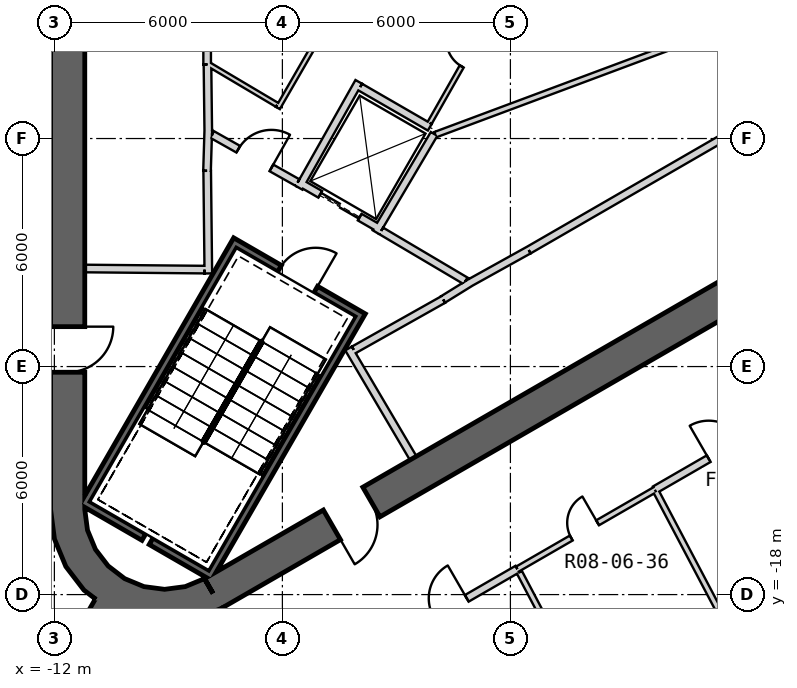
"""IFC4 building model, lengths in metres.
Left out: names, types, materials, properties, quantities, classifications, styles, units other than length and angle.
Written with IfcOpenShell. Run it as: python <this file> out.ifc"""

import sys

from ifc_helpers import new_model, si_unit, direction, frame, frame_2d, origin, place, context, subcontext, project, spatial, polyline, rectangle, outline, extrude, element, fill, save


model = new_model("IFC4")
c1 = context("Model", 3, precision=1e-05, world=origin(), true_north=direction((0.0, 1.0)))
c2 = subcontext(c1, "Body", "Model", "MODEL_VIEW")
j1 = project(units=[si_unit("LENGTHUNIT", "METRE"), si_unit("PLANEANGLEUNIT", "RADIAN")], contexts=[c1])
p1 = place(None, origin())
s1 = spatial("IfcSite", under=j1, at=p1, CompositionType="ELEMENT")
p2 = place(p1, origin())
s2 = spatial("IfcBuilding", under=s1, at=p2, CompositionType="ELEMENT")
p3 = place(p2, frame((0.0, 0.0, 39.5)))
s3 = spatial("IfcBuildingStorey", under=s2, at=p3, CompositionType="ELEMENT", Elevation=39.5)
p4 = place(p3, frame((-11.65, 15.762, 0.0), z_axis=(0.0, 0.0, 1.0), x_axis=(0.0, -1.0, 0.0)))
e1 = element("IfcWall", 1, at=p4, inside=s3, PredefinedType="SHEAR", context=c2, shape_type="SweptSolid", body=[
    extrude(rectangle(XDim=31.523, YDim=0.9, at=frame_2d((15.762, 0.0))), origin(), (0.0, 0.0, 1.0), 6.0),
])
p5 = place(p4, frame((3.612, 0.0, 0.0)))
e2 = element("IfcOpeningElement", 2, at=p5, cuts=e1, PredefinedType="OPENING", context=c2, shape_type="SweptSolid", body=[
    extrude(rectangle(XDim=1.2, YDim=2.4, at=frame_2d((0.6, 1.2))), frame((0.0, 0.46, 0.0), z_axis=(0.0, -1.0, 0.0), x_axis=(1.0, 0.0, 0.0)), (0.0, 0.0, 1.0), 0.92),
])
p6 = place(p4, frame((26.712, 0.0, 0.0)))
e3 = element("IfcOpeningElement", 3, at=p6, cuts=e1, PredefinedType="OPENING", context=c2, shape_type="SweptSolid", body=[
    extrude(rectangle(XDim=1.2, YDim=2.4, at=frame_2d((0.6, 1.2))), frame((0.0, 0.46, 0.0), z_axis=(0.0, -1.0, 0.0), x_axis=(1.0, 0.0, 0.0)), (0.0, 0.0, 1.0), 0.92),
])
p7 = place(p3, frame((-7.825, -17.97, 0.0), z_axis=(0.0, 0.0, 1.0), x_axis=(0.866028369851, 0.499994862586, 0.0)))
e4 = element("IfcWall", 4, at=p7, inside=s3, PredefinedType="SHEAR", context=c2, shape_type="SweptSolid", body=[
    extrude(rectangle(XDim=31.523, YDim=0.9, at=frame_2d((15.762, 0.0))), origin(), (0.0, 0.0, 1.0), 6.0),
])
p8 = place(p7, frame((26.712, 0.0, 0.0)))
e5 = element("IfcOpeningElement", 5, at=p8, cuts=e4, PredefinedType="OPENING", context=c2, shape_type="SweptSolid", body=[
    extrude(rectangle(XDim=1.2, YDim=2.4, at=frame_2d((0.6, 1.2))), frame((0.0, 0.46, 0.0), z_axis=(0.0, -1.0, 0.0), x_axis=(1.0, 0.0, 0.0)), (0.0, 0.0, 1.0), 0.92),
])
p9 = place(p7, frame((3.612, 0.0, 0.0)))
e6 = element("IfcOpeningElement", 6, at=p9, cuts=e4, PredefinedType="OPENING", context=c2, shape_type="SweptSolid", body=[
    extrude(rectangle(XDim=1.2, YDim=2.4, at=frame_2d((0.6, 1.2))), frame((0.0, 0.46, 0.0), z_axis=(0.0, -1.0, 0.0), x_axis=(1.0, 0.0, 0.0)), (0.0, 0.0, 1.0), 0.92),
])
p10 = place(p3, origin())
e7 = element("IfcWall", 7, at=p10, inside=s3, PredefinedType="SHEAR", context=c2, shape_type="SweptSolid", body=[
    extrude(outline(polyline([(-12.1, -15.762), (-11.998, -16.538), (-11.698, -17.262), (-11.221, -17.883), (-10.6, -18.36), (-9.876, -18.659), (-9.1, -18.762), (-8.323, -18.659), (-7.6, -18.36), (-8.05, -17.58), (-8.556, -17.79), (-9.1, -17.862), (-9.644, -17.79), (-10.15, -17.58), (-10.585, -17.247), (-10.919, -16.812), (-11.128, -16.305), (-11.2, -15.762), (-12.1, -15.762)])), origin(), (0.0, 0.0, 1.0), 6.0),
])
p11 = place(p3, frame((-10.575, -18.316, 0.0), z_axis=(0.0, 0.0, 1.0), x_axis=(-0.499996575515, -0.866027380903, 0.0)))
e8 = element("IfcWall", 8, at=p11, inside=s3, PredefinedType="SHEAR", context=c2, shape_type="SweptSolid", body=[
    extrude(rectangle(XDim=13.954, YDim=0.8, at=frame_2d((6.977, 0.0))), origin(), (0.0, 0.0, 1.0), 6.0),
])
p12 = place(p11, frame((1.0, 0.0, 0.0)))
e9 = element("IfcOpeningElement", 9, at=p12, cuts=e8, PredefinedType="OPENING", context=c2, shape_type="SweptSolid", body=[
    extrude(rectangle(XDim=1.4, YDim=2.4, at=frame_2d((0.7, 1.2))), frame((0.0, 0.41, 0.0), z_axis=(0.0, -1.0, 0.0), x_axis=(1.0, 0.0, 0.0)), (0.0, 0.0, 1.0), 0.82),
])
p13 = place(p3, frame((-4.859, -32.954, 0.0), z_axis=(0.0, 0.0, 1.0), x_axis=(0.865991780246, 0.500058233156, 0.0)))
e10 = element("IfcWall", 10, at=p13, inside=s3, PredefinedType="SOLIDWALL", context=c2, shape_type="SweptSolid", body=[
    extrude(rectangle(XDim=41.371, YDim=0.24, at=frame_2d((20.685, 0.0))), origin(), (0.0, 0.0, 1.0), 5.7),
])
p14 = place(p3, frame((-7.98, 4.05, 0.0), z_axis=(0.0, 0.0, 1.0), x_axis=(0.0, -1.0, 0.0)))
e11 = element("IfcWall", 11, at=p14, inside=s3, PredefinedType="PLUMBINGWALL", context=c2, shape_type="SweptSolid", body=[
    extrude(rectangle(XDim=8.1, YDim=0.2, at=frame_2d((4.05, 0.0))), origin(), (0.0, 0.0, 1.0), 5.7),
])
p15 = place(p3, frame((-7.95, -5.772, 0.0), z_axis=(0.0, 0.0, 1.0), x_axis=(-0.030803413295, -0.999525462272, 0.0)))
e12 = element("IfcWall", 12, at=p15, inside=s3, PredefinedType="PLUMBINGWALL", context=c2, shape_type="SweptSolid", body=[
    extrude(rectangle(XDim=1.078, YDim=0.2, at=frame_2d((0.539, 0.0))), origin(), (0.0, 0.0, 1.0), 5.7),
])
p16 = place(p3, frame((-7.971, -4.05, 0.0), z_axis=(0.0, 0.0, 1.0), x_axis=(0.012042535896, -0.999927486035, 0.0)))
e13 = element("IfcWall", 13, at=p16, inside=s3, PredefinedType="PLUMBINGWALL", context=c2, shape_type="SweptSolid", body=[
    extrude(rectangle(XDim=1.845, YDim=0.2, at=frame_2d((0.922, 0.0))), origin(), (0.0, 0.0, 1.0), 5.7),
])
p17 = place(p3, frame((-7.979, -6.85, 0.0), z_axis=(0.0, 0.0, 1.0), x_axis=(0.011121475088, -0.999938154483, 0.0)))
e14 = element("IfcWall", 14, at=p17, inside=s3, PredefinedType="PLUMBINGWALL", context=c2, shape_type="SweptSolid", body=[
    extrude(rectangle(XDim=2.7, YDim=0.2, at=frame_2d((1.35, 0.0))), origin(), (0.0, 0.0, 1.0), 5.7),
])
p18 = place(p3, frame((-8.05, -9.449, 0.0), z_axis=(0.0, 0.0, 1.0), x_axis=(-0.999957467379, 0.009222983926, 0.0)))
e15 = element("IfcWall", 15, at=p18, inside=s3, PredefinedType="PLUMBINGWALL", context=c2, shape_type="SweptSolid", body=[
    extrude(rectangle(XDim=3.15, YDim=0.2, at=frame_2d((1.575, 0.0))), origin(), (0.0, 0.0, 1.0), 5.7),
])
p19 = place(p3, frame((0.483, -8.936, 0.0), z_axis=(0.0, 0.0, 1.0), x_axis=(0.866030989016, 0.499990325971, 0.0)))
e16 = element("IfcWall", 16, at=p19, inside=s3, PredefinedType="PLUMBINGWALL", context=c2, shape_type="SweptSolid", body=[
    extrude(rectangle(XDim=8.1, YDim=0.2, at=frame_2d((4.05, 0.0))), origin(), (0.0, 0.0, 1.0), 5.7),
])
p20 = place(p3, frame((-2.558, -14.409, 0.0), z_axis=(0.0, 0.0, 1.0), x_axis=(-0.507997497166, 0.861358544901, 0.0)))
e17 = element("IfcWall", 17, at=p20, inside=s3, PredefinedType="PLUMBINGWALL", context=c2, shape_type="SweptSolid", body=[
    extrude(rectangle(XDim=3.35, YDim=0.2, at=frame_2d((1.675, 0.0))), origin(), (0.0, 0.0, 1.0), 5.7),
])
p21 = place(p3, frame((-1.769, -10.237, 0.0), z_axis=(0.0, 0.0, 1.0), x_axis=(-0.871534483978, -0.490334215854, 0.0)))
e18 = element("IfcWall", 18, at=p21, inside=s3, PredefinedType="PLUMBINGWALL", context=c2, shape_type="SweptSolid", body=[
    extrude(rectangle(XDim=2.7, YDim=0.2, at=frame_2d((1.35, 0.0))), origin(), (0.0, 0.0, 1.0), 5.7),
])
p22 = place(p3, frame((-1.024, -9.771, 0.0), z_axis=(0.0, 0.0, 1.0), x_axis=(-0.850348075135, -0.526220629693, 0.0)))
e19 = element("IfcWall", 19, at=p22, inside=s3, PredefinedType="PLUMBINGWALL", context=c2, shape_type="SweptSolid", body=[
    extrude(rectangle(XDim=0.878, YDim=0.2, at=frame_2d((0.439, 0.0))), origin(), (0.0, 0.0, 1.0), 5.7),
])
p23 = place(p3, frame((-1.13, -9.831, 0.0), z_axis=(0.0, 0.0, 1.0), x_axis=(0.874269620932, 0.485440655401, 0.0)))
e20 = element("IfcWall", 20, at=p23, inside=s3, PredefinedType="PLUMBINGWALL", context=c2, shape_type="SweptSolid", body=[
    extrude(rectangle(XDim=1.845, YDim=0.2, at=frame_2d((0.922, 0.0))), origin(), (0.0, 0.0, 1.0), 5.7),
])
p24 = place(p3, frame((-3.905, -10.563, -0.35), z_axis=(0.0, 0.0, 1.0), x_axis=(-0.500012932018, -0.866017937352, 0.0)))
e21 = element("IfcWall", 21, at=p24, inside=s3, PredefinedType="SHEAR", context=c2, shape_type="SweptSolid", body=[
    extrude(rectangle(XDim=8.1, YDim=0.2, at=frame_2d((4.05, 0.0))), origin(), (0.0, 0.0, 1.0), 6.05),
])
p25 = place(p3, frame((-11.282, -15.541, -0.35), z_axis=(0.0, 0.0, 1.0), x_axis=(0.866000578957, -0.500042995397, 0.0)))
e22 = element("IfcWall", 22, at=p25, inside=s3, PredefinedType="SHEAR", context=c2, shape_type="SweptSolid", body=[
    extrude(rectangle(XDim=1.89, YDim=0.2, at=frame_2d((0.945, 0.0))), origin(), (0.0, 0.0, 1.0), 6.05),
])
p26 = place(p3, frame((-9.455, -16.596, -0.35), z_axis=(0.0, 0.0, 1.0), x_axis=(0.866038843867, -0.499976720371, 0.0)))
e23 = element("IfcWall", 23, at=p26, inside=s3, PredefinedType="SHEAR", context=c2, shape_type="SweptSolid", body=[
    extrude(rectangle(XDim=1.69, YDim=0.2, at=frame_2d((0.845, 0.0))), origin(), (0.0, 0.0, 1.0), 6.05),
])
p27 = place(p3, frame((-7.196, -8.663, -0.35), z_axis=(0.0, 0.0, 1.0), x_axis=(-0.499997992926, -0.866026562566, 0.0)))
e24 = element("IfcWall", 24, at=p27, inside=s3, PredefinedType="SHEAR", context=c2, shape_type="SweptSolid", body=[
    extrude(rectangle(XDim=7.9, YDim=0.2, at=frame_2d((3.95, 0.0))), origin(), (0.0, 0.0, 1.0), 6.05),
])
p28 = place(p3, frame((-4.041, -10.599, -0.35), z_axis=(0.0, 0.0, 1.0), x_axis=(-0.866047807691, 0.499961193289, 0.0)))
e25 = element("IfcWall", 25, at=p28, inside=s3, PredefinedType="SHEAR", context=c2, shape_type="SweptSolid", body=[
    extrude(rectangle(XDim=3.6, YDim=0.2, at=frame_2d((1.8, 0.0))), origin(), (0.0, 0.0, 1.0), 6.05),
])
p29 = place(p28, frame((1.25, 0.0, 0.35)))
e26 = element("IfcOpeningElement", 26, at=p29, cuts=e25, PredefinedType="OPENING", context=c2, shape_type="SweptSolid", body=[
    extrude(rectangle(XDim=1.1, YDim=2.1, at=frame_2d((0.55, 1.05))), frame((0.0, 0.11, 0.0), z_axis=(0.0, -1.0, 0.0), x_axis=(1.0, 0.0, 0.0)), (0.0, 0.0, 1.0), 0.22),
])
p30 = place(p3, frame((-3.446, -8.368, 0.0), z_axis=(0.0, 0.0, 1.0), x_axis=(-0.866024647952, 0.500001309137, 0.0)))
e27 = element("IfcWall", 27, at=p30, inside=s3, PredefinedType="PLUMBINGWALL", context=c2, shape_type="SweptSolid", body=[
    extrude(rectangle(XDim=2.4, YDim=0.2, at=frame_2d((1.2, 0.0))), origin(), (0.0, 0.0, 1.0), 5.7),
])
p31 = place(p30, frame((0.6, 0.0, 0.0)))
e28 = element("IfcOpeningElement", 28, at=p31, cuts=e27, PredefinedType="OPENING", context=c2, shape_type="SweptSolid", body=[
    extrude(rectangle(XDim=1.2, YDim=2.4, at=frame_2d((0.6, 1.2))), frame((0.0, 0.11, 0.0), z_axis=(0.0, -1.0, 0.0), x_axis=(1.0, 0.0, 0.0)), (0.0, 0.0, 1.0), 0.22),
])
p32 = place(p3, frame((-2.008, -5.878, 0.0), z_axis=(0.0, 0.0, 1.0), x_axis=(-0.508893526607, -0.860829471253, 0.0)))
e29 = element("IfcWall", 29, at=p32, inside=s3, PredefinedType="PLUMBINGWALL", context=c2, shape_type="SweptSolid", body=[
    extrude(rectangle(XDim=3.005, YDim=0.2, at=frame_2d((1.502, 0.0))), origin(), (0.0, 0.0, 1.0), 5.7),
])
p33 = place(p3, frame((-3.99, -4.509, 0.0), z_axis=(0.0, 0.0, 1.0), x_axis=(-0.491358283181, -0.870957540612, 0.0)))
e30 = element("IfcWall", 30, at=p33, inside=s3, PredefinedType="PLUMBINGWALL", context=c2, shape_type="SweptSolid", body=[
    extrude(rectangle(XDim=3.2, YDim=0.2, at=frame_2d((1.6, 0.0))), origin(), (0.0, 0.0, 1.0), 5.7),
])
p34 = place(p3, frame((-3.953, -4.646, 0.0), z_axis=(0.0, 0.0, 1.0), x_axis=(0.866060616833, -0.499939004251, 0.0)))
e31 = element("IfcWall", 31, at=p34, inside=s3, PredefinedType="PLUMBINGWALL", context=c2, shape_type="SweptSolid", body=[
    extrude(rectangle(XDim=2.115, YDim=0.2, at=frame_2d((1.057, 0.0))), origin(), (0.0, 0.0, 1.0), 5.7),
])
p35 = place(p3, frame((-3.401, -8.43, 0.0), z_axis=(0.0, 0.0, 1.0), x_axis=(0.860615607571, -0.509255118781, 0.0)))
e32 = element("IfcWall", 32, at=p35, inside=s3, PredefinedType="PARTITIONING", context=c2, shape_type="SweptSolid", body=[
    extrude(rectangle(XDim=2.581, YDim=0.2, at=frame_2d((1.29, 0.0))), origin(), (0.0, 0.0, 1.0), 5.7),
])
p36 = place(p3, frame((-7.849, -5.894, 0.0), z_axis=(0.0, 0.0, 1.0), x_axis=(0.871363259478, -0.490638431059, 0.0)))
e33 = element("IfcWall", 33, at=p36, inside=s3, PredefinedType="PARTITIONING", context=c2, shape_type="SweptSolid", body=[
    extrude(rectangle(XDim=2.581, YDim=0.2, at=frame_2d((1.291, 0.0))), origin(), (0.0, 0.0, 1.0), 5.7),
])
p37 = place(p36, frame((0.791, 0.0, 0.0)))
e34 = element("IfcOpeningElement", 34, at=p37, cuts=e33, PredefinedType="OPENING", context=c2, shape_type="SweptSolid", body=[
    extrude(rectangle(XDim=1.0, YDim=2.1, at=frame_2d((0.5, 1.05))), frame((0.0, 0.11, 0.0), z_axis=(0.0, -1.0, 0.0), x_axis=(1.0, 0.0, 0.0)), (0.0, 0.0, 1.0), 0.22),
])
p38 = place(p3, frame((6.729, -2.65, 0.0), z_axis=(0.0, 0.0, 1.0), x_axis=(-0.936914282609, -0.349559189613, 0.0)))
e35 = element("IfcWall", 35, at=p38, inside=s3, PredefinedType="PLUMBINGWALL", context=c2, shape_type="SweptSolid", body=[
    extrude(rectangle(XDim=9.291, YDim=0.15, at=frame_2d((4.645, 0.0))), origin(), (0.0, 0.0, 1.0), 5.7),
])
p39 = place(p3, frame((0.007, -1.836, 0.0), z_axis=(0.0, 0.0, 1.0), x_axis=(-0.494077470797, -0.869417881603, 0.0)))
e36 = element("IfcWall", 36, at=p39, inside=s3, PredefinedType="PARTITIONING", context=c2, shape_type="SweptSolid", body=[
    extrude(rectangle(XDim=4.314, YDim=0.12, at=frame_2d((2.157, 0.0))), origin(), (0.0, 0.0, 1.0), 5.7),
])
p40 = place(p39, frame((1.808, 0.0, 0.0)))
e37 = element("IfcOpeningElement", 37, at=p40, cuts=e36, PredefinedType="OPENING", context=c2, shape_type="SweptSolid", body=[
    extrude(rectangle(XDim=0.8, YDim=2.1, at=frame_2d((0.4, 1.05))), frame((0.0, 0.07, 0.0), z_axis=(0.0, -1.0, 0.0), x_axis=(1.0, 0.0, 0.0)), (0.0, 0.0, 1.0), 0.14),
])
p41 = place(p3, frame((-6.118, -5.197, 0.0), z_axis=(0.0, 0.0, 1.0), x_axis=(0.499990139034, 0.866031096941, 0.0)))
e38 = element("IfcWall", 38, at=p41, inside=s3, PredefinedType="PARTITIONING", context=c2, shape_type="SweptSolid", body=[
    extrude(rectangle(XDim=3.0, YDim=0.12, at=frame_2d((1.5, 0.0))), origin(), (0.0, 0.0, 1.0), 5.7),
])
p42 = place(p3, frame((-7.95, -4.041, 0.0), z_axis=(0.0, 0.0, 1.0), x_axis=(0.860112457103, -0.510104461004, 0.0)))
e39 = element("IfcWall", 39, at=p42, inside=s3, PredefinedType="PARTITIONING", context=c2, shape_type="SweptSolid", body=[
    extrude(rectangle(XDim=2.104, YDim=0.12, at=frame_2d((1.052, 0.0))), origin(), (0.0, 0.0, 1.0), 5.7),
])
p43 = place(p3, frame((-6.713, -21.312, 0.0), z_axis=(0.0, 0.0, 1.0), x_axis=(0.866023773276, 0.500002824113, 0.0)))
e40 = element("IfcWall", 40, at=p43, inside=s3, PredefinedType="PARTITIONING", context=c2, shape_type="SweptSolid", body=[
    extrude(rectangle(XDim=7.965, YDim=0.2, at=frame_2d((3.982, 0.0))), origin(), (0.0, 0.0, 1.0), 4.88),
])
p44 = place(p43, frame((1.5, 0.0, 0.0)))
e41 = element("IfcOpeningElement", 41, at=p44, cuts=e40, PredefinedType="OPENING", context=c2, shape_type="SweptSolid", body=[
    extrude(rectangle(XDim=1.0, YDim=2.1, at=frame_2d((0.5, 1.05))), frame((0.0, 0.11, 0.0), z_axis=(0.0, -1.0, 0.0), x_axis=(1.0, 0.0, 0.0)), (0.0, 0.0, 1.0), 0.22),
])
p45 = place(p43, frame((5.426, 0.0, 0.0)))
e42 = element("IfcOpeningElement", 42, at=p45, cuts=e40, PredefinedType="OPENING", context=c2, shape_type="SweptSolid", body=[
    extrude(rectangle(XDim=1.0, YDim=2.1, at=frame_2d((0.5, 1.05))), frame((0.0, 0.11, 0.0), z_axis=(0.0, -1.0, 0.0), x_axis=(1.0, 0.0, 0.0)), (0.0, 0.0, 1.0), 0.22),
])
p46 = place(p3, frame((3.8, -15.242, 0.0), z_axis=(0.0, 0.0, 1.0), x_axis=(0.866025905383, 0.499999131204, 0.0)))
e43 = element("IfcWall", 43, at=p46, inside=s3, PredefinedType="PARTITIONING", context=c2, shape_type="SweptSolid", body=[
    extrude(rectangle(XDim=20.7, YDim=0.2, at=frame_2d((10.35, 0.0))), origin(), (0.0, 0.0, 1.0), 4.88),
])
p47 = place(p46, frame((1.636, 0.0, 0.0)))
e44 = element("IfcOpeningElement", 44, at=p47, cuts=e43, PredefinedType="OPENING", context=c2, shape_type="SweptSolid", body=[
    extrude(rectangle(XDim=1.0, YDim=2.1, at=frame_2d((0.5, 1.05))), frame((0.0, 0.11, 0.0), z_axis=(0.0, -1.0, 0.0), x_axis=(1.0, 0.0, 0.0)), (0.0, 0.0, 1.0), 0.22),
])
p48 = place(p46, frame((5.812, 0.0, 0.0)))
e45 = element("IfcOpeningElement", 45, at=p48, cuts=e43, PredefinedType="OPENING", context=c2, shape_type="SweptSolid", body=[
    extrude(rectangle(XDim=1.0, YDim=2.1, at=frame_2d((0.5, 1.05))), frame((0.0, 0.11, 0.0), z_axis=(0.0, -1.0, 0.0), x_axis=(1.0, 0.0, 0.0)), (0.0, 0.0, 1.0), 0.22),
])
p49 = place(p46, frame((9.987, 0.0, 0.0)))
e46 = element("IfcOpeningElement", 46, at=p49, cuts=e43, PredefinedType="OPENING", context=c2, shape_type="SweptSolid", body=[
    extrude(rectangle(XDim=1.0, YDim=2.1, at=frame_2d((0.5, 1.05))), frame((0.0, 0.11, 0.0), z_axis=(0.0, -1.0, 0.0), x_axis=(1.0, 0.0, 0.0)), (0.0, 0.0, 1.0), 0.22),
])
p50 = place(p46, frame((14.162, 0.0, 0.0)))
e47 = element("IfcOpeningElement", 47, at=p50, cuts=e43, PredefinedType="OPENING", context=c2, shape_type="SweptSolid", body=[
    extrude(rectangle(XDim=1.0, YDim=2.1, at=frame_2d((0.5, 1.05))), frame((0.0, 0.11, 0.0), z_axis=(0.0, -1.0, 0.0), x_axis=(1.0, 0.0, 0.0)), (0.0, 0.0, 1.0), 0.22),
])
p51 = place(p46, frame((18.138, 0.0, 0.0)))
e48 = element("IfcOpeningElement", 48, at=p51, cuts=e43, PredefinedType="OPENING", context=c2, shape_type="SweptSolid", body=[
    extrude(rectangle(XDim=1.0, YDim=2.1, at=frame_2d((0.5, 1.05))), frame((0.0, 0.11, 0.0), z_axis=(0.0, -1.0, 0.0), x_axis=(1.0, 0.0, 0.0)), (0.0, 0.0, 1.0), 0.22),
])
p52 = place(p3, frame((0.184, -17.33, 0.0), z_axis=(0.0, 0.0, 1.0), x_axis=(0.866028817718, 0.499994086848, 0.0)))
e49 = element("IfcWall", 49, at=p52, inside=s3, PredefinedType="PLUMBINGWALL", context=c2, shape_type="SweptSolid", body=[
    extrude(rectangle(XDim=4.175, YDim=0.15, at=frame_2d((2.088, 0.0))), origin(), (0.0, 0.0, 1.0), 4.98),
])
p53 = place(p52, frame((1.636, 0.0, 0.0)))
e50 = element("IfcOpeningElement", 50, at=p53, cuts=e49, PredefinedType="OPENING", context=c2, shape_type="SweptSolid", body=[
    extrude(rectangle(XDim=0.8, YDim=2.1, at=frame_2d((0.4, 1.05))), frame((0.0, 0.085, 0.0), z_axis=(0.0, -1.0, 0.0), x_axis=(1.0, 0.0, 0.0)), (0.0, 0.0, 1.0), 0.17),
])
p54 = place(p3, frame((0.238, -17.414, 0.0), z_axis=(0.0, 0.0, 1.0), x_axis=(0.466378215556, -0.884585417048, 0.0)))
e51 = element("IfcWall", 51, at=p54, inside=s3, PredefinedType="PLUMBINGWALL", context=c2, shape_type="SweptSolid", body=[
    extrude(rectangle(XDim=6.959, YDim=0.15, at=frame_2d((3.479, 0.0))), origin(), (0.0, 0.0, 1.0), 5.7),
])
p55 = place(p3, frame((7.099, -21.482, 0.0), z_axis=(0.0, 0.0, 1.0), x_axis=(-0.466393246704, 0.884577492043, 0.0)))
e52 = element("IfcWall", 52, at=p55, inside=s3, PredefinedType="PLUMBINGWALL", context=c2, shape_type="SweptSolid", body=[
    extrude(rectangle(XDim=6.984, YDim=0.15, at=frame_2d((3.492, 0.0))), origin(), (0.0, 0.0, 1.0), 5.7),
])
p56 = place(p29, origin())
e53 = element("IfcDoor", 53, at=p56, inside=s3, OperationType="SINGLE_SWING_LEFT", PredefinedType="USERDEFINED", context=c2, shape_type="SweptSolid", body=[
    extrude(rectangle(XDim=1.1, YDim=2.1, at=frame_2d((0.55, 1.05))), frame((0.0, 0.025, 0.0), z_axis=(0.0, -1.0, 0.0), x_axis=(1.0, 0.0, 0.0)), (0.0, 0.0, 1.0), 0.05),
])
fill(e26, e53)
p57 = place(p37, origin())
e54 = element("IfcDoor", 54, at=p57, inside=s3, OperationType="SINGLE_SWING_RIGHT", PredefinedType="USERDEFINED", context=c2, shape_type="SweptSolid", body=[
    extrude(rectangle(XDim=1.0, YDim=2.1, at=frame_2d((0.5, 1.05))), frame((0.0, 0.025, 0.0), z_axis=(0.0, -1.0, 0.0), x_axis=(1.0, 0.0, 0.0)), (0.0, 0.0, 1.0), 0.05),
])
fill(e34, e54)
p58 = place(p31, origin())
e55 = element("IfcDoor", 55, at=p58, inside=s3, OperationType="SLIDING_TO_LEFT", PredefinedType="USERDEFINED", context=c2, shape_type="SweptSolid", body=[
    extrude(rectangle(XDim=1.2, YDim=2.4, at=frame_2d((0.6, 1.2))), frame((0.0, 0.025, 0.0), z_axis=(0.0, -1.0, 0.0), x_axis=(1.0, 0.0, 0.0)), (0.0, 0.0, 1.0), 0.05),
])
fill(e28, e55)
p59 = place(p40, origin())
e56 = element("IfcDoor", 56, at=p59, inside=s3, OperationType="SINGLE_SWING_LEFT", PredefinedType="USERDEFINED", context=c2, shape_type="SweptSolid", body=[
    extrude(rectangle(XDim=0.8, YDim=2.1, at=frame_2d((0.4, 1.05))), frame((0.0, 0.025, 0.0), z_axis=(0.0, -1.0, 0.0), x_axis=(1.0, 0.0, 0.0)), (0.0, 0.0, 1.0), 0.05),
])
fill(e37, e56)
p60 = place(p45, origin())
e57 = element("IfcDoor", 57, at=p60, inside=s3, OperationType="SINGLE_SWING_RIGHT", PredefinedType="USERDEFINED", context=c2, shape_type="SweptSolid", body=[
    extrude(rectangle(XDim=1.0, YDim=2.1, at=frame_2d((0.5, 1.05))), frame((0.0, 0.025, 0.0), z_axis=(0.0, -1.0, 0.0), x_axis=(1.0, 0.0, 0.0)), (0.0, 0.0, 1.0), 0.05),
])
fill(e42, e57)
p61 = place(p53, origin())
e58 = element("IfcDoor", 58, at=p61, inside=s3, OperationType="SINGLE_SWING_RIGHT", PredefinedType="USERDEFINED", context=c2, shape_type="SweptSolid", body=[
    extrude(rectangle(XDim=0.8, YDim=2.1, at=frame_2d((0.4, 1.05))), frame((0.0, 0.025, 0.0), z_axis=(0.0, -1.0, 0.0), x_axis=(1.0, 0.0, 0.0)), (0.0, 0.0, 1.0), 0.05),
])
fill(e50, e58)
p62 = place(p47, origin())
e59 = element("IfcDoor", 59, at=p62, inside=s3, OperationType="SINGLE_SWING_LEFT", PredefinedType="USERDEFINED", context=c2, shape_type="SweptSolid", body=[
    extrude(rectangle(XDim=1.0, YDim=2.1, at=frame_2d((0.5, 1.05))), frame((0.0, 0.025, 0.0), z_axis=(0.0, -1.0, 0.0), x_axis=(1.0, 0.0, 0.0)), (0.0, 0.0, 1.0), 0.05),
])
fill(e44, e59)
p63 = place(p6, origin())
e60 = element("IfcDoor", 60, at=p63, inside=s3, OperationType="SINGLE_SWING_LEFT", PredefinedType="USERDEFINED", context=c2, shape_type="SweptSolid", body=[
    extrude(rectangle(XDim=1.2, YDim=2.4, at=frame_2d((0.6, 1.2))), frame((0.0, 0.025, 0.0), z_axis=(0.0, -1.0, 0.0), x_axis=(1.0, 0.0, 0.0)), (0.0, 0.0, 1.0), 0.05),
])
fill(e3, e60)
p64 = place(p9, origin())
e61 = element("IfcDoor", 61, at=p64, inside=s3, OperationType="SINGLE_SWING_LEFT", PredefinedType="USERDEFINED", context=c2, shape_type="SweptSolid", body=[
    extrude(rectangle(XDim=1.2, YDim=2.4, at=frame_2d((0.6, 1.2))), frame((0.0, 0.025, 0.0), z_axis=(0.0, -1.0, 0.0), x_axis=(1.0, 0.0, 0.0)), (0.0, 0.0, 1.0), 0.05),
])
fill(e6, e61)
save(model, sys.argv[1])
